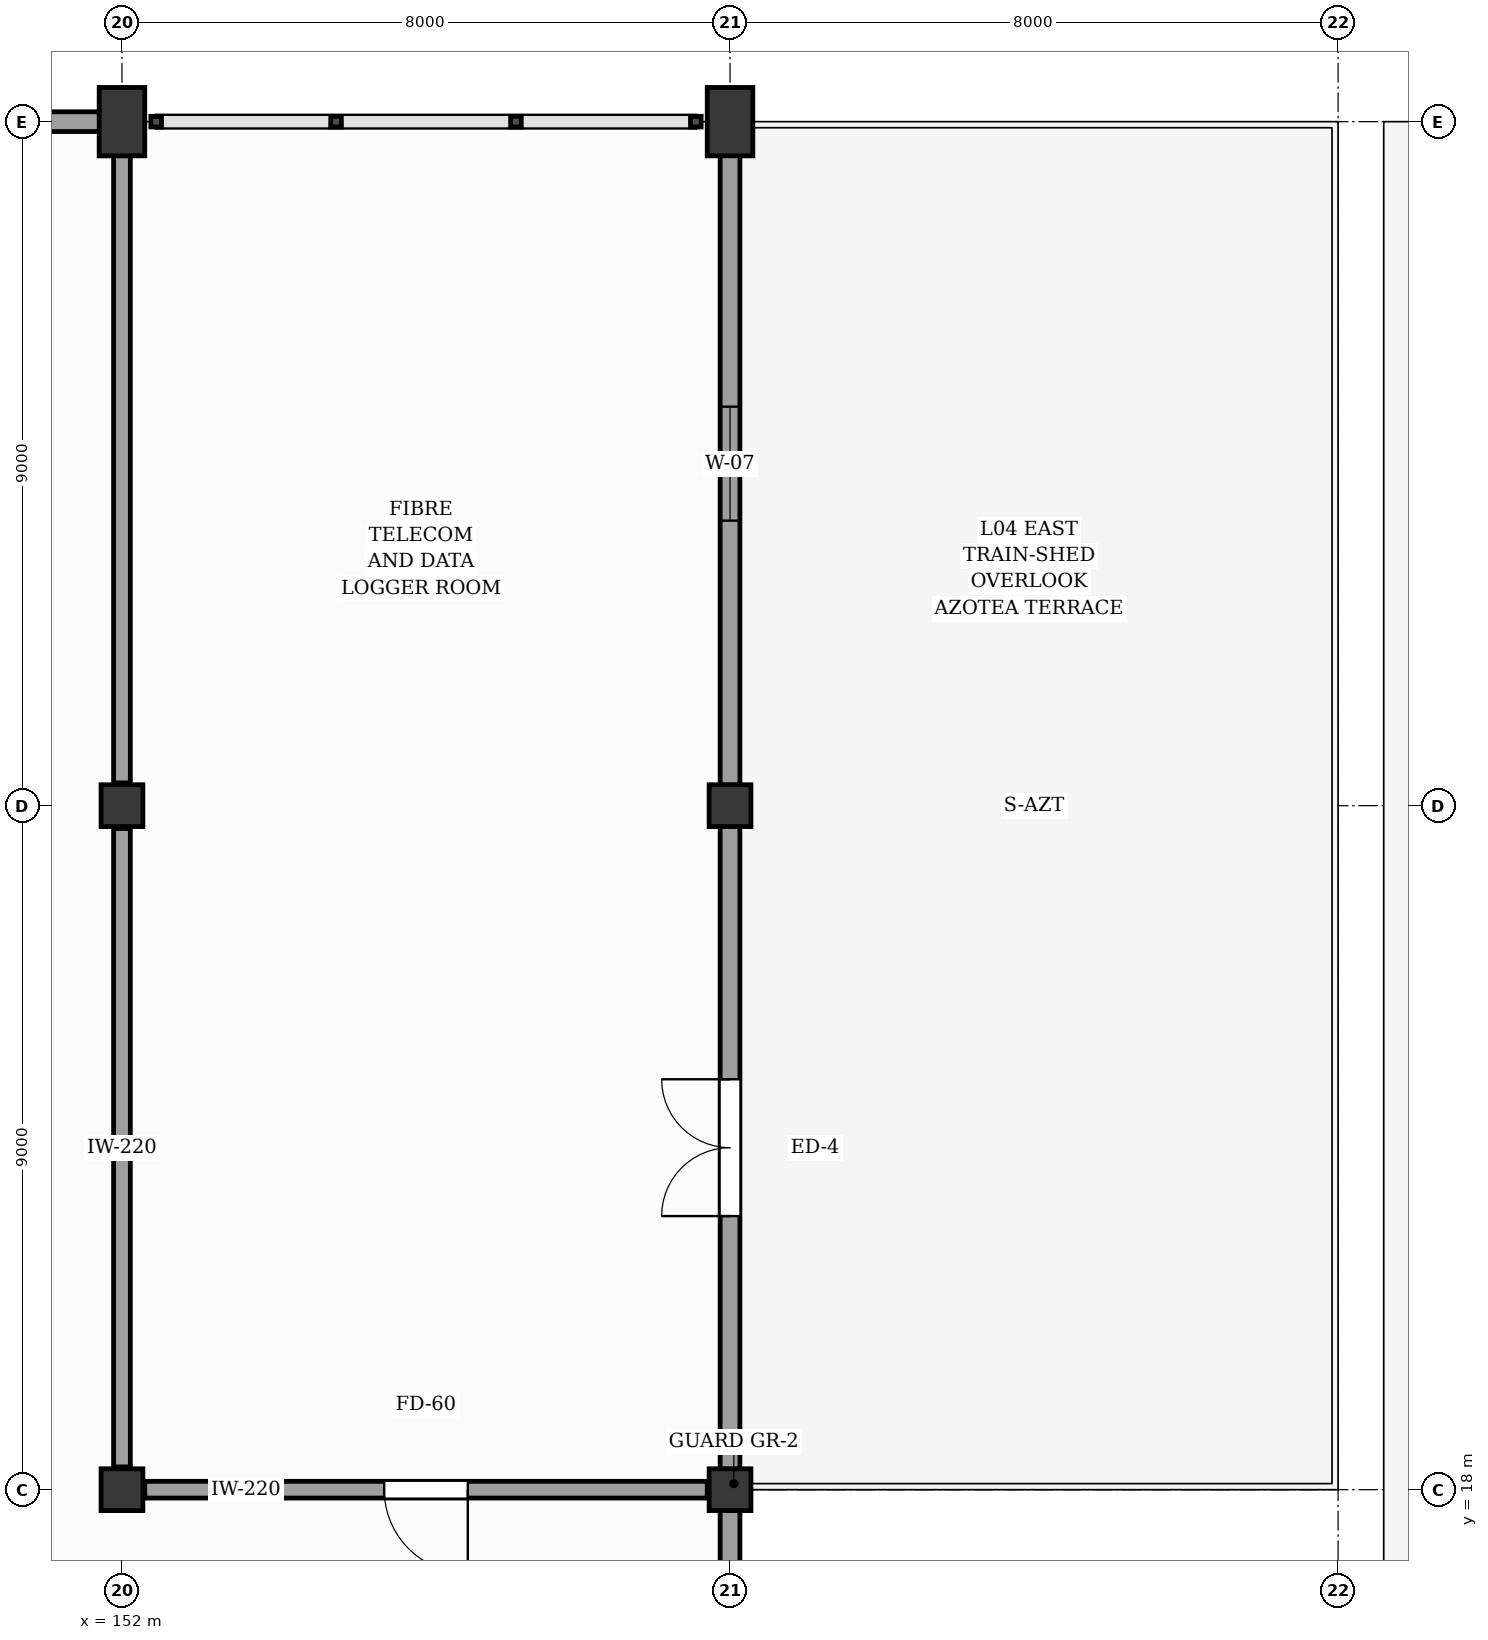
"""IFC4 building model, lengths in metres.
Left out: names, types, materials, properties, quantities, classifications, styles, units other than length and angle.
Written with IfcOpenShell. Run it as: python <this file> out.ifc"""

import sys

from ifc_helpers import new_model, si_unit, direction, frame, frame_2d, origin, origin_2d, place, context, subcontext, project, spatial, rectangle, extrude, element, fill, save


model = new_model("IFC4")
c1 = context("Model", 3, precision=1e-05, world=origin(), true_north=direction((0.0, 1.0)))
c2 = subcontext(c1, "Body", "Model", "MODEL_VIEW")
j1 = project(units=[si_unit("LENGTHUNIT", "METRE"), si_unit("PLANEANGLEUNIT", "RADIAN")], contexts=[c1])
p1 = place(None, origin())
s1 = spatial("IfcSite", under=j1, at=p1, CompositionType="ELEMENT")
p2 = place(p1, origin())
s2 = spatial("IfcBuilding", under=s1, at=p2, CompositionType="ELEMENT")
p3 = place(p2, frame((0.0, 0.0, 20.4)))
s3 = spatial("IfcBuildingStorey", under=s2, at=p3, CompositionType="ELEMENT", Elevation=20.4)
for number, where, z_axis, x_axis in (
    (1, (152.0, 18.0, 0.0), (0.0, 0.0, 1.0), (1.0, 0.0, 0.0)),
    (2, (152.0, 27.0, 0.0), (0.0, 0.0, 1.0), (1.0, 0.0, 0.0)),
):
    element("IfcColumn", number, at=place(p3, frame(where, z_axis=z_axis, x_axis=x_axis)), inside=s3, PredefinedType="COLUMN", context=c2, shape_type="SweptSolid", body=[
        extrude(rectangle(XDim=0.55, YDim=0.55, at=origin_2d()), origin(), (0.0, 0.0, 1.0), 4.2),
    ])
p4 = place(p3, frame((152.0, 36.0, 0.0), z_axis=(0.0, 0.0, 1.0), x_axis=(1.0, 0.0, 0.0)))
e3 = element("IfcColumn", 3, at=p4, inside=s3, PredefinedType="COLUMN", context=c2, shape_type="SweptSolid", body=[
    extrude(rectangle(XDim=0.6, YDim=0.9, at=origin_2d()), origin(), (0.0, 0.0, 1.0), 4.2),
])
for number, where, z_axis, x_axis in (
    (4, (160.0, 18.0, 0.0), (0.0, 0.0, 1.0), (1.0, 0.0, 0.0)),
    (5, (160.0, 27.0, 0.0), (0.0, 0.0, 1.0), (1.0, 0.0, 0.0)),
):
    element("IfcColumn", number, at=place(p3, frame(where, z_axis=z_axis, x_axis=x_axis)), inside=s3, PredefinedType="COLUMN", context=c2, shape_type="SweptSolid", body=[
        extrude(rectangle(XDim=0.55, YDim=0.55, at=origin_2d()), origin(), (0.0, 0.0, 1.0), 4.2),
    ])
p5 = place(p3, frame((160.0, 36.0, 0.0), z_axis=(0.0, 0.0, 1.0), x_axis=(1.0, 0.0, 0.0)))
e6 = element("IfcColumn", 6, at=p5, inside=s3, PredefinedType="COLUMN", context=c2, shape_type="SweptSolid", body=[
    extrude(rectangle(XDim=0.6, YDim=0.9, at=origin_2d()), origin(), (0.0, 0.0, 1.0), 4.2),
])
p6 = place(p3, frame((144.295, 36.0, 0.0), z_axis=(0.0, 0.0, 1.0), x_axis=(1.0, 0.0, 0.0)))
e7 = element("IfcWall", 7, at=p6, inside=s3, PredefinedType="SOLIDWALL", context=c2, shape_type="SweptSolid", body=[
    extrude(rectangle(XDim=7.41, YDim=0.26, at=frame_2d((3.705, 0.0))), origin(), (0.0, 0.0, 1.0), 2.93),
])
p7 = place(p6, frame((2.705, 0.0, 1.45)))
e8 = element("IfcOpeningElement", 8, at=p7, cuts=e7, PredefinedType="OPENING", context=c2, shape_type="SweptSolid", body=[
    extrude(rectangle(XDim=2.0, YDim=1.34, at=frame_2d((1.0, 0.67))), frame((0.0, 0.14, 0.0), z_axis=(0.0, -1.0, 0.0), x_axis=(1.0, 0.0, 0.0)), (0.0, 0.0, 1.0), 0.28),
])
p8 = place(p3, frame((160.0, 9.27, 0.0), z_axis=(0.0, 0.0, 1.0), x_axis=(0.0, 1.0, 0.0)))
e9 = element("IfcWall", 9, at=p8, inside=s3, PredefinedType="SOLIDWALL", context=c2, shape_type="SweptSolid", body=[
    extrude(rectangle(XDim=8.46, YDim=0.26, at=frame_2d((4.23, 0.0))), origin(), (0.0, 0.0, 1.0), 3.18),
])
p9 = place(p8, frame((3.48, 0.0, 0.95)))
e10 = element("IfcOpeningElement", 10, at=p9, cuts=e9, PredefinedType="OPENING", context=c2, shape_type="SweptSolid", body=[
    extrude(rectangle(XDim=1.5, YDim=1.9, at=frame_2d((0.75, 0.95))), frame((0.0, 0.14, 0.0), z_axis=(0.0, -1.0, 0.0), x_axis=(1.0, 0.0, 0.0)), (0.0, 0.0, 1.0), 0.28),
])
p10 = place(p3, frame((160.0, 18.27, 0.0), z_axis=(0.0, 0.0, 1.0), x_axis=(0.0, 1.0, 0.0)))
e11 = element("IfcWall", 11, at=p10, inside=s3, PredefinedType="SOLIDWALL", context=c2, shape_type="SweptSolid", body=[
    extrude(rectangle(XDim=8.46, YDim=0.26, at=frame_2d((4.23, 0.0))), origin(), (0.0, 0.0, 1.0), 3.18),
])
p11 = place(p10, frame((3.33, 0.0, 0.0)))
e12 = element("IfcOpeningElement", 12, at=p11, cuts=e11, PredefinedType="OPENING", context=c2, shape_type="SweptSolid", body=[
    extrude(rectangle(XDim=1.8, YDim=2.2, at=frame_2d((0.9, 1.1))), frame((0.0, 0.14, 0.0), z_axis=(0.0, -1.0, 0.0), x_axis=(1.0, 0.0, 0.0)), (0.0, 0.0, 1.0), 0.28),
])
p12 = place(p3, frame((160.0, 27.27, 0.0), z_axis=(0.0, 0.0, 1.0), x_axis=(0.0, 1.0, 0.0)))
e13 = element("IfcWall", 13, at=p12, inside=s3, PredefinedType="SOLIDWALL", context=c2, shape_type="SweptSolid", body=[
    extrude(rectangle(XDim=8.33, YDim=0.26, at=frame_2d((4.165, 0.0))), origin(), (0.0, 0.0, 1.0), 2.93),
])
p13 = place(p12, frame((3.48, 0.0, 0.95)))
e14 = element("IfcOpeningElement", 14, at=p13, cuts=e13, PredefinedType="OPENING", context=c2, shape_type="SweptSolid", body=[
    extrude(rectangle(XDim=1.5, YDim=1.84, at=frame_2d((0.75, 0.92))), frame((0.0, 0.14, 0.0), z_axis=(0.0, -1.0, 0.0), x_axis=(1.0, 0.0, 0.0)), (0.0, 0.0, 1.0), 0.28),
])
p14 = place(p3, frame((152.3, 18.0, 0.0), z_axis=(0.0, 0.0, 1.0), x_axis=(1.0, 0.0, 0.0)))
e15 = element("IfcWall", 15, at=p14, inside=s3, PredefinedType="SOLIDWALL", context=c2, shape_type="SweptSolid", body=[
    extrude(rectangle(XDim=7.4, YDim=0.22, at=frame_2d((3.7, 0.0))), origin(), (0.0, 0.0, 1.0), 3.1),
])
p15 = place(p14, frame((3.15, 0.0, 0.0)))
e16 = element("IfcOpeningElement", 16, at=p15, cuts=e15, PredefinedType="OPENING", context=c2, shape_type="SweptSolid", body=[
    extrude(rectangle(XDim=1.1, YDim=2.15, at=frame_2d((0.55, 1.075))), frame((0.0, 0.12, 0.0), z_axis=(0.0, -1.0, 0.0), x_axis=(1.0, 0.0, 0.0)), (0.0, 0.0, 1.0), 0.24),
])
p16 = place(p3, frame((152.0, 18.3, 0.0), z_axis=(0.0, 0.0, 1.0), x_axis=(0.0, 1.0, 0.0)))
e17 = element("IfcWall", 17, at=p16, inside=s3, PredefinedType="SOLIDWALL", context=c2, shape_type="SweptSolid", body=[
    extrude(rectangle(XDim=8.4, YDim=0.22, at=frame_2d((4.2, 0.0))), origin(), (0.0, 0.0, 1.0), 3.1),
])
p17 = place(p3, frame((152.0, 27.3, 0.0), z_axis=(0.0, 0.0, 1.0), x_axis=(0.0, 1.0, 0.0)))
e18 = element("IfcWall", 18, at=p17, inside=s3, PredefinedType="SOLIDWALL", context=c2, shape_type="SweptSolid", body=[
    extrude(rectangle(XDim=8.4, YDim=0.22, at=frame_2d((4.2, 0.0))), origin(), (0.0, 0.0, 1.0), 2.93),
])
p18 = place(p11, origin())
e19 = element("IfcDoor", 19, at=p18, inside=s3, OperationType="DOUBLE_DOOR_SINGLE_SWING", PredefinedType="DOOR", context=c2, shape_type="SweptSolid", body=[
    extrude(rectangle(XDim=1.8, YDim=2.2, at=frame_2d((0.9, 1.1))), frame((0.0, 0.025, 0.0), z_axis=(0.0, -1.0, 0.0), x_axis=(1.0, 0.0, 0.0)), (0.0, 0.0, 1.0), 0.05),
])
fill(e12, e19)
p19 = place(p13, origin())
e20 = element("IfcWindow", 20, at=p19, inside=s3, PartitioningType="SINGLE_PANEL", PredefinedType="WINDOW", context=c2, shape_type="SweptSolid", body=[
    extrude(rectangle(XDim=1.5, YDim=1.84, at=frame_2d((0.75, 0.92))), frame((0.0, 0.03, 0.0), z_axis=(0.0, -1.0, 0.0), x_axis=(1.0, 0.0, 0.0)), (0.0, 0.0, 1.0), 0.06),
])
fill(e14, e20)
p20 = place(p15, frame((1.1, 0.0, 0.0), z_axis=(0.0, 0.0, 1.0), x_axis=(-1.0, 0.0, 0.0)))
e21 = element("IfcDoor", 21, at=p20, inside=s3, OperationType="SINGLE_SWING_RIGHT", PredefinedType="DOOR", context=c2, shape_type="SweptSolid", body=[
    extrude(rectangle(XDim=1.1, YDim=2.15, at=frame_2d((0.55, 1.075))), frame((0.0, 0.025, 0.0), z_axis=(0.0, -1.0, 0.0), x_axis=(1.0, 0.0, 0.0)), (0.0, 0.0, 1.0), 0.05),
])
fill(e16, e21)
save(model, sys.argv[1])
